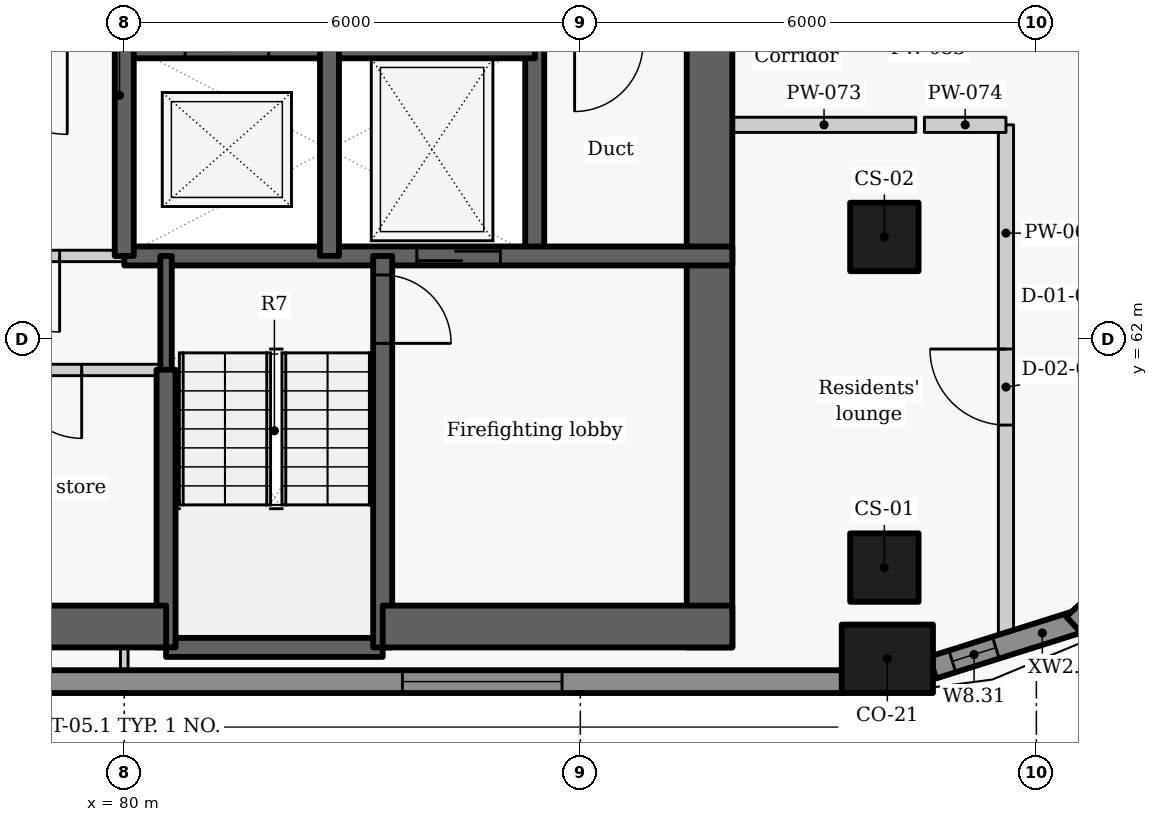
"""IFC4 building model, lengths in metres.
Left out: names, types, materials, properties, quantities, classifications, styles, units other than length and angle.
Written with IfcOpenShell. Run it as: python <this file> out.ifc"""

import sys

from ifc_helpers import new_model, si_unit, direction, frame, frame_2d, origin, origin_2d, place, context, subcontext, project, spatial, rectangle, extrude, element, fill, save


model = new_model("IFC4")
c1 = context("Model", 3, precision=1e-05, world=origin(), true_north=direction((0.0, 1.0)))
c2 = subcontext(c1, "Body", "Model", "MODEL_VIEW")
j1 = project(units=[si_unit("LENGTHUNIT", "METRE"), si_unit("PLANEANGLEUNIT", "RADIAN")], contexts=[c1])
p1 = place(None, origin())
s1 = spatial("IfcSite", under=j1, at=p1, CompositionType="ELEMENT")
p2 = place(p1, origin())
s2 = spatial("IfcBuilding", under=s1, at=p2, CompositionType="ELEMENT")
p3 = place(p2, frame((0.0, 0.0, 213.0)))
s3 = spatial("IfcBuildingStorey", under=s2, at=p3, CompositionType="ELEMENT", Elevation=213.0)
p4 = place(p3, frame((90.04, 57.8, 0.0), z_axis=(0.0, 0.0, 1.0), x_axis=(1.0, 0.0, 0.0)))
e1 = element("IfcColumn", 1, at=p4, inside=s3, PredefinedType="COLUMN", context=c2, shape_type="SweptSolid", body=[
    extrude(rectangle(XDim=1.2, YDim=0.9, at=origin_2d()), origin(), (0.0, 0.0, 1.0), 3.3),
])
for number, where, z_axis, x_axis in (
    (2, (90.0, 59.0, 0.0), (0.0, 0.0, 1.0), (0.0, 1.0, 0.0)),
    (3, (90.0, 63.35, 0.0), (0.0, 0.0, 1.0), (0.0, 1.0, 0.0)),
):
    element("IfcColumn", number, at=place(p3, frame(where, z_axis=z_axis, x_axis=x_axis)), inside=s3, PredefinedType="COLUMN", context=c2, shape_type="SweptSolid", body=[
        extrude(rectangle(XDim=0.9, YDim=0.9, at=origin_2d()), origin(), (0.0, 0.0, 1.0), 3.3),
    ])
p5 = place(p3, frame((70.551, 57.5, 0.0), z_axis=(0.0, 0.0, 1.0), x_axis=(1.0, 0.0, 0.0)))
e4 = element("IfcWall", 4, at=p5, inside=s3, PredefinedType="SOLIDWALL", context=c2, shape_type="SweptSolid", body=[
    extrude(rectangle(XDim=18.893, YDim=0.3, at=frame_2d((9.446, 0.0))), origin(), (0.0, 0.0, 1.0), 2.425),
])
p6 = place(p5, frame((3.687, 0.0, 0.9)))
e5 = element("IfcOpeningElement", 5, at=p6, cuts=e4, PredefinedType="OPENING", context=c2, shape_type="SweptSolid", body=[
    extrude(rectangle(XDim=2.1, YDim=1.1, at=frame_2d((1.05, 0.55))), frame((0.0, 0.16, 0.0), z_axis=(0.0, -1.0, 0.0), x_axis=(1.0, 0.0, 0.0)), (0.0, 0.0, 1.0), 0.32),
])
p7 = place(p5, frame((13.109, 0.0, 0.9)))
e6 = element("IfcOpeningElement", 6, at=p7, cuts=e4, PredefinedType="OPENING", context=c2, shape_type="SweptSolid", body=[
    extrude(rectangle(XDim=2.1, YDim=1.1, at=frame_2d((1.05, 0.55))), frame((0.0, 0.16, 0.0), z_axis=(0.0, -1.0, 0.0), x_axis=(1.0, 0.0, 0.0)), (0.0, 0.0, 1.0), 0.32),
])
p8 = place(p3, frame((90.636, 57.685, 0.0), z_axis=(0.0, 0.0, 1.0), x_axis=(0.95368324118, 0.300812691707, 0.0)))
e7 = element("IfcWall", 7, at=p8, inside=s3, PredefinedType="SOLIDWALL", context=c2, shape_type="SweptSolid", body=[
    extrude(rectangle(XDim=2.053, YDim=0.3, at=frame_2d((1.027, 0.0))), origin(), (0.0, 0.0, 1.0), 2.425),
])
p9 = place(p8, frame((0.271, 0.0, 0.9)))
e8 = element("IfcOpeningElement", 8, at=p9, cuts=e7, PredefinedType="OPENING", context=c2, shape_type="SweptSolid", body=[
    extrude(rectangle(XDim=0.6, YDim=1.1, at=frame_2d((0.3, 0.55))), frame((0.0, 0.16, 0.0), z_axis=(0.0, -1.0, 0.0), x_axis=(1.0, 0.0, 0.0)), (0.0, 0.0, 1.0), 0.32),
])
p10 = place(p3, frame((92.494, 58.244, 0.0), z_axis=(0.0, 0.0, 1.0), x_axis=(0.73764876128, 0.675184645102, 0.0)))
e9 = element("IfcWall", 9, at=p10, inside=s3, PredefinedType="SOLIDWALL", context=c2, shape_type="SweptSolid", body=[
    extrude(rectangle(XDim=2.048, YDim=0.3, at=frame_2d((1.024, 0.0))), origin(), (0.0, 0.0, 1.0), 2.425),
])
p11 = place(p3, frame((85.4, 63.1, -0.275), z_axis=(0.0, 0.0, 1.0), x_axis=(0.0, 1.0, 0.0)))
e10 = element("IfcWall", 10, at=p11, inside=s3, PredefinedType="SHEAR", context=c2, shape_type="SweptSolid", body=[
    extrude(rectangle(XDim=2.8, YDim=0.25, at=frame_2d((1.4, 0.0))), origin(), (0.0, 0.0, 1.0), 3.3),
])
p12 = place(p3, frame((87.7, 72.2, -0.275), z_axis=(0.0, 0.0, 1.0), x_axis=(0.0, -1.0, 0.0)))
e11 = element("IfcWall", 11, at=p12, inside=s3, PredefinedType="SHEAR", context=c2, shape_type="SweptSolid", body=[
    extrude(rectangle(XDim=14.25, YDim=0.6, at=frame_2d((7.125, 0.0))), origin(), (0.0, 0.0, 1.0), 3.3),
])
p13 = place(p12, frame((3.852, 0.0, 0.275)))
e12 = element("IfcOpeningElement", 12, at=p13, cuts=e11, PredefinedType="OPENING", context=c2, shape_type="SweptSolid", body=[
    extrude(rectangle(XDim=1.5, YDim=2.1, at=frame_2d((0.75, 1.05))), frame((0.0, 0.31, 0.0), z_axis=(0.0, -1.0, 0.0), x_axis=(1.0, 0.0, 0.0)), (0.0, 0.0, 1.0), 0.62),
])
p14 = place(p3, frame((79.997, 65.9, -0.275), z_axis=(0.0, 0.0, 1.0), x_axis=(1.0, 0.0, 0.0)))
e13 = element("IfcWall", 13, at=p14, inside=s3, PredefinedType="SHEAR", context=c2, shape_type="SweptSolid", body=[
    extrude(rectangle(XDim=5.406, YDim=0.4, at=frame_2d((2.703, 0.0))), origin(), (0.0, 0.0, 1.0), 3.3),
])
p15 = place(p14, frame((0.803, 0.0, 0.275)))
e14 = element("IfcOpeningElement", 14, at=p15, cuts=e13, PredefinedType="OPENING", context=c2, shape_type="SweptSolid", body=[
    extrude(rectangle(XDim=1.1, YDim=2.1, at=frame_2d((0.55, 1.05))), frame((0.0, 0.21, 0.0), z_axis=(0.0, -1.0, 0.0), x_axis=(1.0, 0.0, 0.0)), (0.0, 0.0, 1.0), 0.42),
])
p16 = place(p3, frame((80.0, 63.1, -0.275), z_axis=(0.0, 0.0, 1.0), x_axis=(1.0, 0.0, 0.0)))
e15 = element("IfcWall", 15, at=p16, inside=s3, PredefinedType="SHEAR", context=c2, shape_type="SweptSolid", body=[
    extrude(rectangle(XDim=8.0, YDim=0.25, at=frame_2d((4.0, 0.0))), origin(), (0.0, 0.0, 1.0), 3.3),
])
p17 = place(p16, frame((3.849, 0.0, 0.275)))
e16 = element("IfcOpeningElement", 16, at=p17, cuts=e15, PredefinedType="OPENING", context=c2, shape_type="SweptSolid", body=[
    extrude(rectangle(XDim=1.1, YDim=2.1, at=frame_2d((0.55, 1.05))), frame((0.0, 0.135, 0.0), z_axis=(0.0, -1.0, 0.0), x_axis=(1.0, 0.0, 0.0)), (0.0, 0.0, 1.0), 0.27),
])
p18 = place(p3, frame((80.0, 63.1, -0.275), z_axis=(0.0, 0.0, 1.0), x_axis=(0.0, 1.0, 0.0)))
e17 = element("IfcWall", 17, at=p18, inside=s3, PredefinedType="SHEAR", context=c2, shape_type="SweptSolid", body=[
    extrude(rectangle(XDim=2.8, YDim=0.25, at=frame_2d((1.4, 0.0))), origin(), (0.0, 0.0, 1.0), 3.3),
])
p19 = place(p3, frame((80.0, 63.1, 0.0), z_axis=(0.0, 0.0, 1.0), x_axis=(-1.0, 0.0, 0.0)))
e18 = element("IfcWall", 18, at=p19, inside=s3, PredefinedType="PARTITIONING", context=c2, shape_type="SweptSolid", body=[
    extrude(rectangle(XDim=2.7, YDim=0.15, at=frame_2d((1.35, 0.0))), origin(), (0.0, 0.0, 1.0), 3.025),
])
p20 = place(p19, frame((0.85, 0.0, 0.0)))
e19 = element("IfcOpeningElement", 19, at=p20, cuts=e18, PredefinedType="OPENING", context=c2, shape_type="SweptSolid", body=[
    extrude(rectangle(XDim=1.0, YDim=2.1, at=frame_2d((0.5, 1.05))), frame((0.0, 0.085, 0.0), z_axis=(0.0, -1.0, 0.0), x_axis=(1.0, 0.0, 0.0)), (0.0, 0.0, 1.0), 0.17),
])
p21 = place(p3, frame((82.7, 63.1, -0.275), z_axis=(0.0, 0.0, 1.0), x_axis=(0.0, 1.0, 0.0)))
e20 = element("IfcWall", 20, at=p21, inside=s3, PredefinedType="SHEAR", context=c2, shape_type="SweptSolid", body=[
    extrude(rectangle(XDim=2.8, YDim=0.25, at=frame_2d((1.4, 0.0))), origin(), (0.0, 0.0, 1.0), 3.3),
])
p22 = place(p3, frame((80.55, 57.95, -0.275), z_axis=(0.0, 0.0, 1.0), x_axis=(1.0, 0.0, 0.0)))
e21 = element("IfcWall", 21, at=p22, inside=s3, PredefinedType="SHEAR", context=c2, shape_type="SweptSolid", body=[
    extrude(rectangle(XDim=2.85, YDim=0.25, at=frame_2d((1.425, 0.0))), origin(), (0.0, 0.0, 1.0), 3.3),
])
p23 = place(p3, frame((83.4, 63.1, -0.275), z_axis=(0.0, 0.0, 1.0), x_axis=(0.0, -1.0, 0.0)))
e22 = element("IfcWall", 22, at=p23, inside=s3, PredefinedType="SHEAR", context=c2, shape_type="SweptSolid", body=[
    extrude(rectangle(XDim=5.15, YDim=0.25, at=frame_2d((2.575, 0.0))), origin(), (0.0, 0.0, 1.0), 3.3),
])
p24 = place(p23, frame((0.25, 0.0, 0.275)))
e23 = element("IfcOpeningElement", 23, at=p24, cuts=e22, PredefinedType="OPENING", context=c2, shape_type="SweptSolid", body=[
    extrude(rectangle(XDim=0.9, YDim=2.1, at=frame_2d((0.45, 1.05))), frame((0.0, 0.135, 0.0), z_axis=(0.0, -1.0, 0.0), x_axis=(1.0, 0.0, 0.0)), (0.0, 0.0, 1.0), 0.27),
])
p25 = place(p3, frame((80.55, 61.597, -0.275), z_axis=(0.0, 0.0, 1.0), x_axis=(0.0, 1.0, 0.0)))
e24 = element("IfcWall", 24, at=p25, inside=s3, PredefinedType="SHEAR", context=c2, shape_type="SweptSolid", body=[
    extrude(rectangle(XDim=1.503, YDim=0.15, at=frame_2d((0.751, 0.0))), origin(), (0.0, 0.0, 1.0), 3.3),
])
p26 = place(p3, frame((80.55, 57.95, -0.275), z_axis=(0.0, 0.0, 1.0), x_axis=(0.0, 1.0, 0.0)))
e25 = element("IfcWall", 25, at=p26, inside=s3, PredefinedType="SHEAR", context=c2, shape_type="SweptSolid", body=[
    extrude(rectangle(XDim=3.653, YDim=0.25, at=frame_2d((1.827, 0.0))), origin(), (0.0, 0.0, 1.0), 3.3),
])
p27 = place(p3, frame((75.35, 58.225, -0.275), z_axis=(0.0, 0.0, 1.0), x_axis=(1.0, 0.0, 0.0)))
e26 = element("IfcWall", 26, at=p27, inside=s3, PredefinedType="SHEAR", context=c2, shape_type="SweptSolid", body=[
    extrude(rectangle(XDim=5.2, YDim=0.55, at=frame_2d((2.6, 0.0))), origin(), (0.0, 0.0, 1.0), 3.3),
])
p28 = place(p3, frame((83.4, 58.225, -0.275), z_axis=(0.0, 0.0, 1.0), x_axis=(1.0, 0.0, 0.0)))
e27 = element("IfcWall", 27, at=p28, inside=s3, PredefinedType="SHEAR", context=c2, shape_type="SweptSolid", body=[
    extrude(rectangle(XDim=4.6, YDim=0.55, at=frame_2d((2.3, 0.0))), origin(), (0.0, 0.0, 1.0), 3.3),
])
p29 = place(p3, frame((80.55, 61.6, 0.0), z_axis=(0.0, 0.0, 1.0), x_axis=(-1.0, 0.0, 0.0)))
e28 = element("IfcWall", 28, at=p29, inside=s3, PredefinedType="PARTITIONING", context=c2, shape_type="SweptSolid", body=[
    extrude(rectangle(XDim=5.2, YDim=0.15, at=frame_2d((2.6, 0.0))), origin(), (0.0, 0.0, 1.0), 3.025),
])
p30 = place(p29, frame((3.71, 0.0, 0.0)))
e29 = element("IfcOpeningElement", 29, at=p30, cuts=e28, PredefinedType="OPENING", context=c2, shape_type="SweptSolid", body=[
    extrude(rectangle(XDim=0.9, YDim=2.1, at=frame_2d((0.45, 1.05))), frame((0.0, 0.085, 0.0), z_axis=(0.0, -1.0, 0.0), x_axis=(1.0, 0.0, 0.0)), (0.0, 0.0, 1.0), 0.17),
])
p31 = place(p29, frame((1.11, 0.0, 0.0)))
e30 = element("IfcOpeningElement", 30, at=p31, cuts=e28, PredefinedType="OPENING", context=c2, shape_type="SweptSolid", body=[
    extrude(rectangle(XDim=0.9, YDim=2.1, at=frame_2d((0.45, 1.05))), frame((0.0, 0.085, 0.0), z_axis=(0.0, -1.0, 0.0), x_axis=(1.0, 0.0, 0.0)), (0.0, 0.0, 1.0), 0.17),
])
p32 = place(p3, frame((91.6, 57.926, 0.0), z_axis=(0.0, 0.0, 1.0), x_axis=(0.0, 1.0, 0.0)))
e31 = element("IfcWall", 31, at=p32, inside=s3, PredefinedType="PARTITIONING", context=c2, shape_type="SweptSolid", body=[
    extrude(rectangle(XDim=6.899, YDim=0.2, at=frame_2d((3.449, 0.0))), origin(), (0.0, 0.0, 1.0), 2.405),
])
p33 = place(p32, frame((2.949, 0.0, 0.0)))
e32 = element("IfcOpeningElement", 32, at=p33, cuts=e31, PredefinedType="OPENING", context=c2, shape_type="SweptSolid", body=[
    extrude(rectangle(XDim=1.0, YDim=2.1, at=frame_2d((0.5, 1.05))), frame((0.0, 0.11, 0.0), z_axis=(0.0, -1.0, 0.0), x_axis=(1.0, 0.0, 0.0)), (0.0, 0.0, 1.0), 0.22),
])
p34 = place(p3, frame((88.0, 64.825, 0.0), z_axis=(0.0, 0.0, 1.0), x_axis=(1.0, 0.0, 0.0)))
e33 = element("IfcWall", 33, at=p34, inside=s3, PredefinedType="PARTITIONING", context=c2, shape_type="SweptSolid", body=[
    extrude(rectangle(XDim=2.413, YDim=0.2, at=frame_2d((1.207, 0.0))), origin(), (0.0, 0.0, 1.0), 2.505),
])
p35 = place(p3, frame((90.527, 64.825, 0.0), z_axis=(0.0, 0.0, 1.0), x_axis=(1.0, 0.0, 0.0)))
e34 = element("IfcWall", 34, at=p35, inside=s3, PredefinedType="PARTITIONING", context=c2, shape_type="SweptSolid", body=[
    extrude(rectangle(XDim=1.073, YDim=0.2, at=frame_2d((0.537, 0.0))), origin(), (0.0, 0.0, 1.0), 3.025),
])
p36 = place(p3, frame((80.0, 57.65, 0.0), z_axis=(0.0, 0.0, 1.0), x_axis=(0.0, 1.0, 0.0)))
e35 = element("IfcWall", 35, at=p36, inside=s3, PredefinedType="PARTITIONING", context=c2, shape_type="SweptSolid", body=[
    extrude(rectangle(XDim=0.3, YDim=0.1, at=frame_2d((0.15, 0.0))), origin(), (0.0, 0.0, 1.0), 3.025),
])
p37 = place(p7, origin())
e36 = element("IfcWindow", 36, at=p37, inside=s3, PartitioningType="SINGLE_PANEL", PredefinedType="WINDOW", context=c2, shape_type="SweptSolid", body=[
    extrude(rectangle(XDim=2.1, YDim=1.1, at=frame_2d((1.05, 0.55))), frame((0.0, 0.03, 0.0), z_axis=(0.0, -1.0, 0.0), x_axis=(1.0, 0.0, 0.0)), (0.0, 0.0, 1.0), 0.06),
])
fill(e6, e36)
p38 = place(p9, origin())
e37 = element("IfcWindow", 37, at=p38, inside=s3, PartitioningType="SINGLE_PANEL", PredefinedType="WINDOW", context=c2, shape_type="SweptSolid", body=[
    extrude(rectangle(XDim=0.6, YDim=1.1, at=frame_2d((0.3, 0.55))), frame((0.0, 0.03, 0.0), z_axis=(0.0, -1.0, 0.0), x_axis=(1.0, 0.0, 0.0)), (0.0, 0.0, 1.0), 0.06),
])
fill(e8, e37)
p39 = place(p17, origin())
e38 = element("IfcDoor", 38, at=p39, inside=s3, OperationType="SLIDING_TO_LEFT", PredefinedType="DOOR", context=c2, shape_type="SweptSolid", body=[
    extrude(rectangle(XDim=1.1, YDim=2.1, at=frame_2d((0.55, 1.05))), frame((0.0, 0.025, 0.0), z_axis=(0.0, -1.0, 0.0), x_axis=(1.0, 0.0, 0.0)), (0.0, 0.0, 1.0), 0.05),
])
fill(e16, e38)
p40 = place(p20, origin())
e39 = element("IfcDoor", 39, at=p40, inside=s3, OperationType="SINGLE_SWING_LEFT", PredefinedType="DOOR", context=c2, shape_type="SweptSolid", body=[
    extrude(rectangle(XDim=1.0, YDim=2.1, at=frame_2d((0.5, 1.05))), frame((0.0, 0.025, 0.0), z_axis=(0.0, -1.0, 0.0), x_axis=(1.0, 0.0, 0.0)), (0.0, 0.0, 1.0), 0.05),
])
fill(e19, e39)
p41 = place(p31, origin())
e40 = element("IfcDoor", 40, at=p41, inside=s3, OperationType="SINGLE_SWING_LEFT", PredefinedType="DOOR", context=c2, shape_type="SweptSolid", body=[
    extrude(rectangle(XDim=0.9, YDim=2.1, at=frame_2d((0.45, 1.05))), frame((0.0, 0.025, 0.0), z_axis=(0.0, -1.0, 0.0), x_axis=(1.0, 0.0, 0.0)), (0.0, 0.0, 1.0), 0.05),
])
fill(e30, e40)
p42 = place(p24, origin())
e41 = element("IfcDoor", 41, at=p42, inside=s3, OperationType="SINGLE_SWING_RIGHT", PredefinedType="DOOR", context=c2, shape_type="SweptSolid", body=[
    extrude(rectangle(XDim=0.9, YDim=2.1, at=frame_2d((0.45, 1.05))), frame((0.0, 0.025, 0.0), z_axis=(0.0, -1.0, 0.0), x_axis=(1.0, 0.0, 0.0)), (0.0, 0.0, 1.0), 0.05),
])
fill(e23, e41)
p43 = place(p33, origin())
e42 = element("IfcDoor", 42, at=p43, inside=s3, OperationType="SINGLE_SWING_RIGHT", PredefinedType="DOOR", context=c2, shape_type="SweptSolid", body=[
    extrude(rectangle(XDim=1.0, YDim=2.1, at=frame_2d((0.5, 1.05))), frame((0.0, 0.025, 0.0), z_axis=(0.0, -1.0, 0.0), x_axis=(1.0, 0.0, 0.0)), (0.0, 0.0, 1.0), 0.05),
])
fill(e32, e42)
save(model, sys.argv[1])
